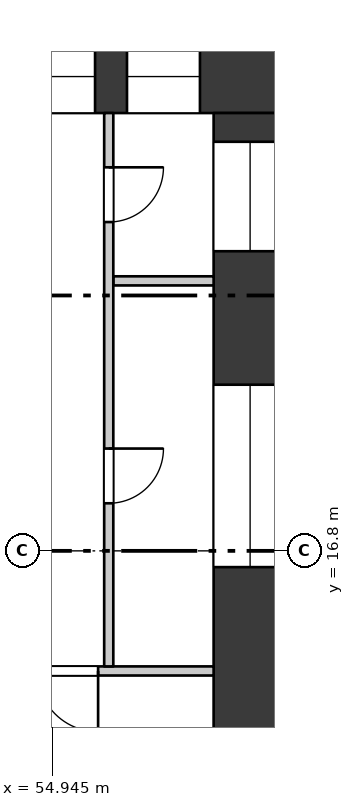
"""IFC4 building model, lengths in metres.
Left out: names, types, materials, properties, quantities, classifications, styles, units other than length and angle.
Written with IfcOpenShell. Run it as: python <this file> out.ifc"""

import sys

from ifc_helpers import new_model, si_unit, direction, frame, frame_2d, origin, place, context, subcontext, project, spatial, rectangle, extrude, element, fill, save


model = new_model("IFC4")
c1 = context("Model", 3, precision=1e-05, world=origin(), true_north=direction((0.0, 1.0)))
c2 = subcontext(c1, "Body", "Model", "MODEL_VIEW")
j1 = project(units=[si_unit("LENGTHUNIT", "METRE"), si_unit("PLANEANGLEUNIT", "RADIAN")], contexts=[c1])
p1 = place(None, origin())
s1 = spatial("IfcSite", under=j1, at=p1, CompositionType="ELEMENT")
p2 = place(p1, origin())
s2 = spatial("IfcBuilding", under=s1, at=p2, CompositionType="ELEMENT")
p3 = place(p2, frame((0.0, 0.0, 214.2)))
s3 = spatial("IfcBuildingStorey", under=s2, at=p3, CompositionType="ELEMENT", Elevation=214.2)
p4 = place(p3, frame((42.0, 24.6, 0.0), z_axis=(0.0, 0.0, 1.0), x_axis=(1.0, 0.0, 0.0)))
e1 = element("IfcWall", 1, at=p4, inside=s3, PredefinedType="SHEAR", context=c2, shape_type="SweptSolid", body=[
    extrude(rectangle(XDim=16.8, YDim=1.2, at=frame_2d((8.4, 0.0))), origin(), (0.0, 0.0, 1.0), 3.22),
])
p5 = place(p4, frame((1.8, 0.0, 0.5)))
e2 = element("IfcOpeningElement", 2, at=p5, cuts=e1, PredefinedType="OPENING", context=c2, shape_type="SweptSolid", body=[
    extrude(rectangle(XDim=1.8, YDim=2.4, at=frame_2d((0.9, 1.2))), frame((0.0, 0.61, 0.0), z_axis=(0.0, -1.0, 0.0), x_axis=(1.0, 0.0, 0.0)), (0.0, 0.0, 1.0), 1.22),
])
p6 = place(p4, frame((4.49, 0.0, 1.6)))
e3 = element("IfcOpeningElement", 3, at=p6, cuts=e1, PredefinedType="OPENING", context=c2, shape_type="SweptSolid", body=[
    extrude(rectangle(XDim=0.9, YDim=1.2, at=frame_2d((0.45, 0.6))), frame((0.0, 0.61, 0.0), z_axis=(0.0, -1.0, 0.0), x_axis=(1.0, 0.0, 0.0)), (0.0, 0.0, 1.0), 1.22),
])
p7 = place(p4, frame((5.71, 0.0, 1.6)))
e4 = element("IfcOpeningElement", 4, at=p7, cuts=e1, PredefinedType="OPENING", context=c2, shape_type="SweptSolid", body=[
    extrude(rectangle(XDim=1.1, YDim=1.2, at=frame_2d((0.55, 0.6))), frame((0.0, 0.61, 0.0), z_axis=(0.0, -1.0, 0.0), x_axis=(1.0, 0.0, 0.0)), (0.0, 0.0, 1.0), 1.22),
])
p8 = place(p4, frame((7.15, 0.0, 1.6)))
e5 = element("IfcOpeningElement", 5, at=p8, cuts=e1, PredefinedType="OPENING", context=c2, shape_type="SweptSolid", body=[
    extrude(rectangle(XDim=1.1, YDim=1.2, at=frame_2d((0.55, 0.6))), frame((0.0, 0.61, 0.0), z_axis=(0.0, -1.0, 0.0), x_axis=(1.0, 0.0, 0.0)), (0.0, 0.0, 1.0), 1.22),
])
p9 = place(p4, frame((12.65, 0.0, 0.6)))
e6 = element("IfcOpeningElement", 6, at=p9, cuts=e1, PredefinedType="OPENING", context=c2, shape_type="SweptSolid", body=[
    extrude(rectangle(XDim=1.0, YDim=2.1, at=frame_2d((0.5, 1.05))), frame((0.0, 0.61, 0.0), z_axis=(0.0, -1.0, 0.0), x_axis=(1.0, 0.0, 0.0)), (0.0, 0.0, 1.0), 1.22),
])
p10 = place(p4, frame((14.175, 0.0, 1.6)))
e7 = element("IfcOpeningElement", 7, at=p10, cuts=e1, PredefinedType="OPENING", context=c2, shape_type="SweptSolid", body=[
    extrude(rectangle(XDim=1.2, YDim=1.2, at=frame_2d((0.6, 0.6))), frame((0.0, 0.61, 0.0), z_axis=(0.0, -1.0, 0.0), x_axis=(1.0, 0.0, 0.0)), (0.0, 0.0, 1.0), 1.22),
])
p11 = place(p3, frame((58.2, 9.6, 0.0), z_axis=(0.0, 0.0, 1.0), x_axis=(0.0, 1.0, 0.0)))
e8 = element("IfcWall", 8, at=p11, inside=s3, PredefinedType="SHEAR", context=c2, shape_type="SweptSolid", body=[
    extrude(rectangle(XDim=14.4, YDim=1.2, at=frame_2d((7.2, 0.0))), origin(), (0.0, 0.0, 1.0), 3.22),
])
p12 = place(p11, frame((1.105, 0.0, 0.6)))
e9 = element("IfcOpeningElement", 9, at=p12, cuts=e8, PredefinedType="OPENING", context=c2, shape_type="SweptSolid", body=[
    extrude(rectangle(XDim=3.0, YDim=2.1, at=frame_2d((1.5, 1.05))), frame((0.0, 0.61, 0.0), z_axis=(0.0, -1.0, 0.0), x_axis=(1.0, 0.0, 0.0)), (0.0, 0.0, 1.0), 1.22),
])
p13 = place(p11, frame((6.933, 0.0, 1.6)))
e10 = element("IfcOpeningElement", 10, at=p13, cuts=e8, PredefinedType="OPENING", context=c2, shape_type="SweptSolid", body=[
    extrude(rectangle(XDim=3.0, YDim=1.2, at=frame_2d((1.5, 0.6))), frame((0.0, 0.61, 0.0), z_axis=(0.0, -1.0, 0.0), x_axis=(1.0, 0.0, 0.0)), (0.0, 0.0, 1.0), 1.22),
])
p14 = place(p11, frame((12.127, 0.0, 1.6)))
e11 = element("IfcOpeningElement", 11, at=p14, cuts=e8, PredefinedType="OPENING", context=c2, shape_type="SweptSolid", body=[
    extrude(rectangle(XDim=1.8, YDim=1.2, at=frame_2d((0.9, 0.6))), frame((0.0, 0.61, 0.0), z_axis=(0.0, -1.0, 0.0), x_axis=(1.0, 0.0, 0.0)), (0.0, 0.0, 1.0), 1.22),
])
p15 = place(p3, frame((54.6, 14.825, 0.0), z_axis=(0.0, 0.0, 1.0), x_axis=(1.0, 0.0, 0.0)))
e12 = element("IfcWall", 12, at=p15, inside=s3, PredefinedType="PARTITIONING", context=c2, shape_type="SweptSolid", body=[
    extrude(rectangle(XDim=3.0, YDim=0.15, at=frame_2d((1.5, 0.0))), origin(), (0.0, 0.0, 1.0), 3.22),
])
p16 = place(p15, frame((0.1, 0.0, 0.0)))
e13 = element("IfcOpeningElement", 13, at=p16, cuts=e12, PredefinedType="OPENING", context=c2, shape_type="SweptSolid", body=[
    extrude(rectangle(XDim=1.0, YDim=2.1, at=frame_2d((0.5, 1.05))), frame((0.0, 0.085, 0.0), z_axis=(0.0, -1.0, 0.0), x_axis=(1.0, 0.0, 0.0)), (0.0, 0.0, 1.0), 0.17),
])
p17 = place(p3, frame((55.95, 21.24, 0.0), z_axis=(0.0, 0.0, 1.0), x_axis=(1.0, 0.0, 0.0)))
e14 = element("IfcWall", 14, at=p17, inside=s3, PredefinedType="PARTITIONING", context=c2, shape_type="SweptSolid", body=[
    extrude(rectangle(XDim=1.65, YDim=0.15, at=frame_2d((0.825, 0.0))), origin(), (0.0, 0.0, 1.0), 3.22),
])
p18 = place(p3, frame((55.875, 14.9, 0.0), z_axis=(0.0, 0.0, 1.0), x_axis=(0.0, 1.0, 0.0)))
e15 = element("IfcWall", 15, at=p18, inside=s3, PredefinedType="PARTITIONING", context=c2, shape_type="SweptSolid", body=[
    extrude(rectangle(XDim=9.1, YDim=0.15, at=frame_2d((4.55, 0.0))), origin(), (0.0, 0.0, 1.0), 3.22),
])
p19 = place(p18, frame((2.683, 0.0, 0.0)))
e16 = element("IfcOpeningElement", 16, at=p19, cuts=e15, PredefinedType="OPENING", context=c2, shape_type="SweptSolid", body=[
    extrude(rectangle(XDim=0.9, YDim=2.1, at=frame_2d((0.45, 1.05))), frame((0.0, 0.085, 0.0), z_axis=(0.0, -1.0, 0.0), x_axis=(1.0, 0.0, 0.0)), (0.0, 0.0, 1.0), 0.17),
])
p20 = place(p18, frame((7.308, 0.0, 0.0)))
e17 = element("IfcOpeningElement", 17, at=p20, cuts=e15, PredefinedType="OPENING", context=c2, shape_type="SweptSolid", body=[
    extrude(rectangle(XDim=0.9, YDim=2.1, at=frame_2d((0.45, 1.05))), frame((0.0, 0.085, 0.0), z_axis=(0.0, -1.0, 0.0), x_axis=(1.0, 0.0, 0.0)), (0.0, 0.0, 1.0), 0.17),
])
p21 = place(p16, frame((1.0, 0.0, 0.0), z_axis=(0.0, 0.0, 1.0), x_axis=(-1.0, 0.0, 0.0)))
e18 = element("IfcDoor", 18, at=p21, inside=s3, OperationType="SINGLE_SWING_LEFT", PredefinedType="DOOR", context=c2, shape_type="SweptSolid", body=[
    extrude(rectangle(XDim=1.0, YDim=2.1, at=frame_2d((0.5, 1.05))), frame((0.0, 0.025, 0.0), z_axis=(0.0, -1.0, 0.0), x_axis=(1.0, 0.0, 0.0)), (0.0, 0.0, 1.0), 0.05),
])
fill(e13, e18)
p22 = place(p19, frame((0.9, 0.0, 0.0), z_axis=(0.0, 0.0, 1.0), x_axis=(-1.0, 0.0, 0.0)))
e19 = element("IfcDoor", 19, at=p22, inside=s3, OperationType="SINGLE_SWING_LEFT", PredefinedType="DOOR", context=c2, shape_type="SweptSolid", body=[
    extrude(rectangle(XDim=0.9, YDim=2.1, at=frame_2d((0.45, 1.05))), frame((0.0, 0.025, 0.0), z_axis=(0.0, -1.0, 0.0), x_axis=(1.0, 0.0, 0.0)), (0.0, 0.0, 1.0), 0.05),
])
fill(e16, e19)
p23 = place(p20, frame((0.9, 0.0, 0.0), z_axis=(0.0, 0.0, 1.0), x_axis=(-1.0, 0.0, 0.0)))
e20 = element("IfcDoor", 20, at=p23, inside=s3, OperationType="SINGLE_SWING_LEFT", PredefinedType="DOOR", context=c2, shape_type="SweptSolid", body=[
    extrude(rectangle(XDim=0.9, YDim=2.1, at=frame_2d((0.45, 1.05))), frame((0.0, 0.025, 0.0), z_axis=(0.0, -1.0, 0.0), x_axis=(1.0, 0.0, 0.0)), (0.0, 0.0, 1.0), 0.05),
])
fill(e17, e20)
p24 = place(p9, origin())
e21 = element("IfcWindow", 21, at=p24, inside=s3, PartitioningType="SINGLE_PANEL", PredefinedType="WINDOW", context=c2, shape_type="SweptSolid", body=[
    extrude(rectangle(XDim=1.0, YDim=2.1, at=frame_2d((0.5, 1.05))), frame((0.0, 0.03, 0.0), z_axis=(0.0, -1.0, 0.0), x_axis=(1.0, 0.0, 0.0)), (0.0, 0.0, 1.0), 0.06),
])
fill(e6, e21)
p25 = place(p10, origin())
e22 = element("IfcWindow", 22, at=p25, inside=s3, PartitioningType="SINGLE_PANEL", PredefinedType="WINDOW", context=c2, shape_type="SweptSolid", body=[
    extrude(rectangle(XDim=1.2, YDim=1.2, at=frame_2d((0.6, 0.6))), frame((0.0, 0.03, 0.0), z_axis=(0.0, -1.0, 0.0), x_axis=(1.0, 0.0, 0.0)), (0.0, 0.0, 1.0), 0.06),
])
fill(e7, e22)
p26 = place(p13, origin())
e23 = element("IfcWindow", 23, at=p26, inside=s3, PartitioningType="SINGLE_PANEL", PredefinedType="WINDOW", context=c2, shape_type="SweptSolid", body=[
    extrude(rectangle(XDim=3.0, YDim=1.2, at=frame_2d((1.5, 0.6))), frame((0.0, 0.03, 0.0), z_axis=(0.0, -1.0, 0.0), x_axis=(1.0, 0.0, 0.0)), (0.0, 0.0, 1.0), 0.06),
])
fill(e10, e23)
p27 = place(p14, origin())
e24 = element("IfcWindow", 24, at=p27, inside=s3, PartitioningType="SINGLE_PANEL", PredefinedType="WINDOW", context=c2, shape_type="SweptSolid", body=[
    extrude(rectangle(XDim=1.8, YDim=1.2, at=frame_2d((0.9, 0.6))), frame((0.0, 0.03, 0.0), z_axis=(0.0, -1.0, 0.0), x_axis=(1.0, 0.0, 0.0)), (0.0, 0.0, 1.0), 0.06),
])
fill(e11, e24)
save(model, sys.argv[1])
